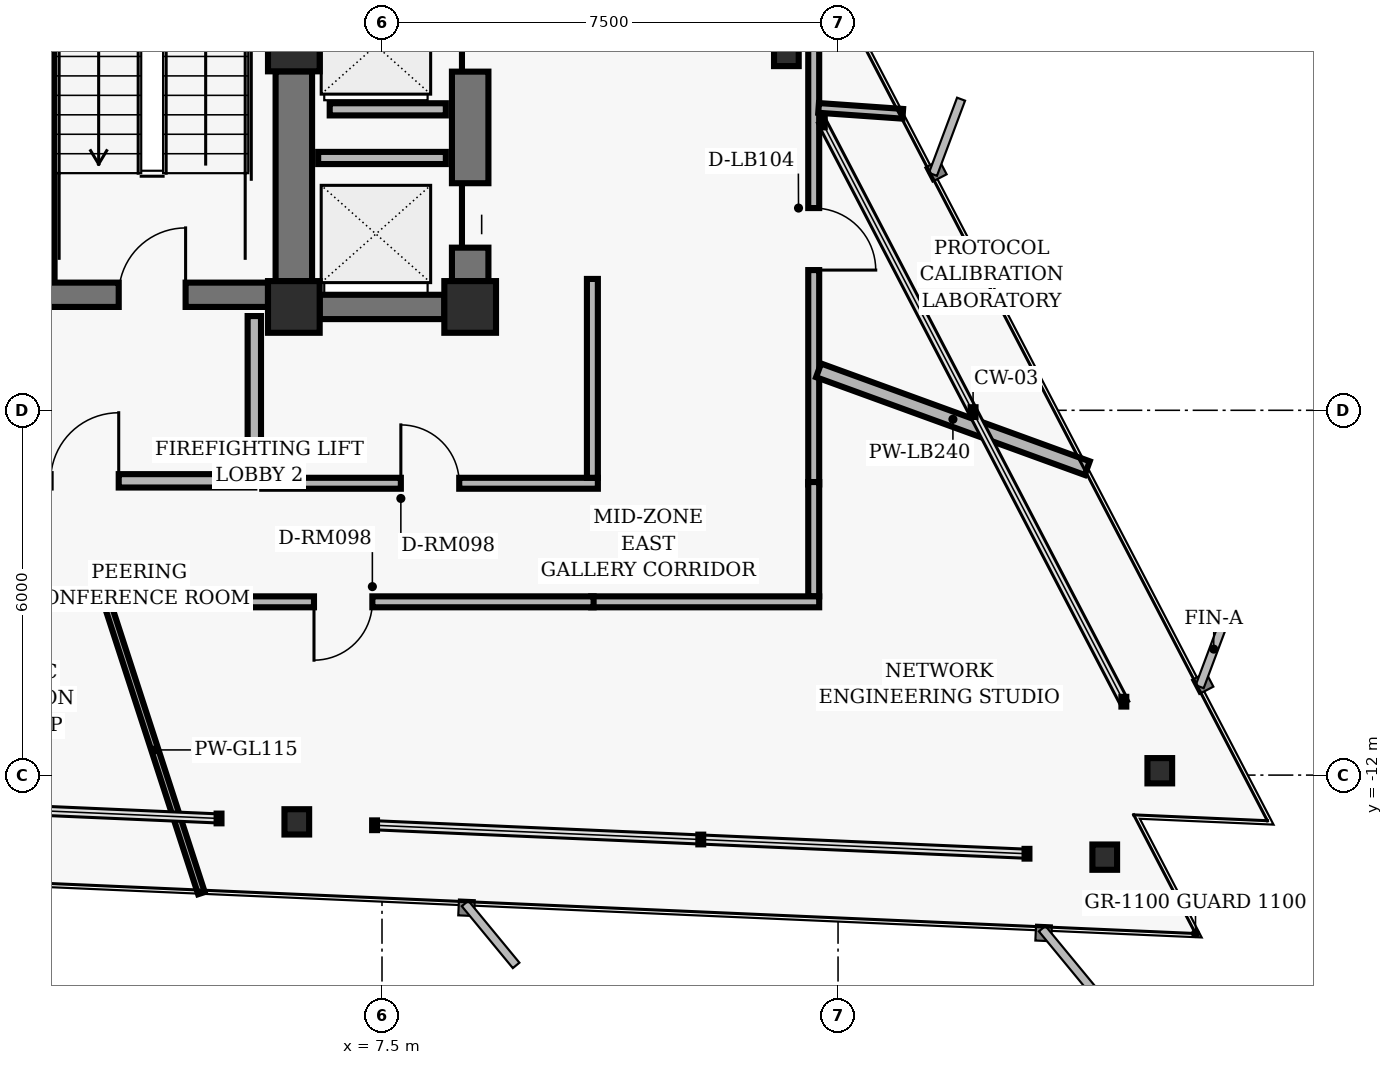
"""IFC4 building model, lengths in metres.
Left out: names, types, materials, properties, quantities, classifications, styles, units other than length and angle.
Written with IfcOpenShell. Run it as: python <this file> out.ifc"""

import sys

from ifc_helpers import new_model, si_unit, direction, frame, frame_2d, origin, origin_2d, place, context, subcontext, project, spatial, rectangle, hollow_rectangle, i_section, extrude, element, fill, save


model = new_model("IFC4")
c1 = context("Model", 3, precision=1e-05, world=origin(), true_north=direction((0.0, 1.0)))
c2 = subcontext(c1, "Body", "Model", "MODEL_VIEW")
j1 = project(units=[si_unit("LENGTHUNIT", "METRE"), si_unit("PLANEANGLEUNIT", "RADIAN")], contexts=[c1])
p1 = place(None, origin())
s1 = spatial("IfcSite", under=j1, at=p1, CompositionType="ELEMENT")
p2 = place(p1, origin())
s2 = spatial("IfcBuilding", under=s1, at=p2, CompositionType="ELEMENT")
p3 = place(p2, frame((0.0, 0.0, 135.04)))
s3 = spatial("IfcBuildingStorey", under=s2, at=p3, CompositionType="ELEMENT", Elevation=135.04)
for number, where, z_axis, x_axis in (
    (1, (6.05, 0.0, 0.0), (0.0, 0.0, 1.0), (1.0, 0.0, 0.0)),
    (2, (6.05, -4.3, 0.0), (0.0, 0.0, 1.0), (1.0, 0.0, 0.0)),
    (3, (8.95, -4.3, 0.0), (0.0, 0.0, 1.0), (1.0, 0.0, 0.0)),
):
    element("IfcColumn", number, at=place(p3, frame(where, z_axis=z_axis, x_axis=x_axis)), inside=s3, PredefinedType="COLUMN", context=c2, shape_type="SweptSolid", body=[
        extrude(hollow_rectangle(XDim=0.85, YDim=0.85, WallThickness=0.055, InnerFilletRadius=0.02, OuterFilletRadius=0.04, at=origin_2d()), origin(), (0.0, 0.0, 1.0), 3.04),
    ])
p4 = place(p3, frame((6.05, -3.875, 0.0), z_axis=(0.0, 0.0, 1.0), x_axis=(0.0, 1.0, 0.0)))
e4 = element("IfcWall", 4, at=p4, inside=s3, PredefinedType="SHEAR", context=c2, shape_type="SweptSolid", body=[
    extrude(rectangle(XDim=3.45, YDim=0.6, at=frame_2d((1.725, 0.0))), origin(), (0.0, 0.0, 1.0), 2.788),
])
p5 = place(p3, frame((1.94, -4.1, 0.0), z_axis=(0.0, 0.0, 1.0), x_axis=(0.0, 1.0, 0.0)))
e5 = element("IfcWall", 5, at=p5, inside=s3, PredefinedType="SHEAR", context=c2, shape_type="SweptSolid", body=[
    extrude(rectangle(XDim=8.2, YDim=0.35, at=frame_2d((4.1, 0.0))), origin(), (0.0, 0.0, 1.0), 2.788),
])
p6 = place(p3, frame((-5.625, -4.1, 0.0), z_axis=(0.0, 0.0, 1.0), x_axis=(1.0, 0.0, 0.0)))
e6 = element("IfcWall", 6, at=p6, inside=s3, PredefinedType="SHEAR", context=c2, shape_type="SweptSolid", body=[
    extrude(rectangle(XDim=11.25, YDim=0.4, at=frame_2d((5.625, 0.0))), origin(), (0.0, 0.0, 1.0), 2.788),
])
p7 = place(p6, frame((1.355, 0.0, 0.0)))
e7 = element("IfcOpeningElement", 7, at=p7, cuts=e6, PredefinedType="OPENING", context=c2, shape_type="SweptSolid", body=[
    extrude(rectangle(XDim=1.1, YDim=2.04, at=frame_2d((0.55, 1.02))), frame((0.0, 0.21, 0.0), z_axis=(0.0, -1.0, 0.0), x_axis=(1.0, 0.0, 0.0)), (0.0, 0.0, 1.0), 0.42),
])
p8 = place(p6, frame((8.795, 0.0, 0.0)))
e8 = element("IfcOpeningElement", 8, at=p8, cuts=e6, PredefinedType="OPENING", context=c2, shape_type="SweptSolid", body=[
    extrude(rectangle(XDim=1.1, YDim=2.04, at=frame_2d((0.55, 1.02))), frame((0.0, 0.21, 0.0), z_axis=(0.0, -1.0, 0.0), x_axis=(1.0, 0.0, 0.0)), (0.0, 0.0, 1.0), 0.42),
])
p9 = place(p6, frame((4.095, 0.0, 0.0)))
e9 = element("IfcOpeningElement", 9, at=p9, cuts=e6, PredefinedType="OPENING", context=c2, shape_type="SweptSolid", body=[
    extrude(rectangle(XDim=1.06, YDim=2.04, at=frame_2d((0.53, 1.02))), frame((0.0, 0.21, 0.0), z_axis=(0.0, -1.0, 0.0), x_axis=(1.0, 0.0, 0.0)), (0.0, 0.0, 1.0), 0.42),
])
p10 = place(p6, frame((6.095, 0.0, 0.0)))
e10 = element("IfcOpeningElement", 10, at=p10, cuts=e6, PredefinedType="OPENING", context=c2, shape_type="SweptSolid", body=[
    extrude(rectangle(XDim=1.06, YDim=2.04, at=frame_2d((0.53, 1.02))), frame((0.0, 0.21, 0.0), z_axis=(0.0, -1.0, 0.0), x_axis=(1.0, 0.0, 0.0)), (0.0, 0.0, 1.0), 0.42),
])
p11 = place(p3, frame((8.95, -3.875, 0.0), z_axis=(0.0, 0.0, 1.0), x_axis=(0.0, 1.0, 0.0)))
e11 = element("IfcWall", 11, at=p11, inside=s3, PredefinedType="SHEAR", context=c2, shape_type="SweptSolid", body=[
    extrude(rectangle(XDim=7.95, YDim=0.6, at=frame_2d((3.975, 0.0))), origin(), (0.0, 0.0, 1.0), 2.788),
])
p12 = place(p11, frame((0.55, 0.0, 0.0)))
e12 = element("IfcOpeningElement", 12, at=p12, cuts=e11, PredefinedType="OPENING", context=c2, shape_type="SweptSolid", body=[
    extrude(rectangle(XDim=1.06, YDim=2.04, at=frame_2d((0.53, 1.02))), frame((0.0, 0.31, 0.0), z_axis=(0.0, -1.0, 0.0), x_axis=(1.0, 0.0, 0.0)), (0.0, 0.0, 1.0), 0.62),
])
p13 = place(p11, frame((3.445, 0.0, 0.0)))
e13 = element("IfcOpeningElement", 13, at=p13, cuts=e11, PredefinedType="OPENING", context=c2, shape_type="SweptSolid", body=[
    extrude(rectangle(XDim=1.06, YDim=2.04, at=frame_2d((0.53, 1.02))), frame((0.0, 0.31, 0.0), z_axis=(0.0, -1.0, 0.0), x_axis=(1.0, 0.0, 0.0)), (0.0, 0.0, 1.0), 0.62),
])
p14 = place(p11, frame((6.33, 0.0, 0.0)))
e14 = element("IfcOpeningElement", 14, at=p14, cuts=e11, PredefinedType="OPENING", context=c2, shape_type="SweptSolid", body=[
    extrude(rectangle(XDim=1.06, YDim=2.04, at=frame_2d((0.53, 1.02))), frame((0.0, 0.31, 0.0), z_axis=(0.0, -1.0, 0.0), x_axis=(1.0, 0.0, 0.0)), (0.0, 0.0, 1.0), 0.62),
])
p15 = place(p3, frame((6.475, -4.3, 0.0), z_axis=(0.0, 0.0, 1.0), x_axis=(1.0, 0.0, 0.0)))
e15 = element("IfcWall", 15, at=p15, inside=s3, PredefinedType="SHEAR", context=c2, shape_type="SweptSolid", body=[
    extrude(rectangle(XDim=2.05, YDim=0.4, at=frame_2d((1.025, 0.0))), origin(), (0.0, 0.0, 1.0), 2.788),
])
for number, where, z_axis, x_axis in (
    (16, (20.292, -11.928, 0.0), (0.0, 0.0, 1.0), (1.0, 0.0, 0.0)),
    (17, (14.15, -0.131, 0.0), (0.0, 0.0, 1.0), (1.0, 0.0, 0.0)),
    (18, (6.099, -12.769, 0.0), (0.0, 0.0, 1.0), (1.0, 0.0, 0.0)),
    (19, (19.386, -13.349, 0.0), (0.0, 0.0, 1.0), (1.0, 0.0, 0.0)),
):
    element("IfcColumn", number, at=place(p3, frame(where, z_axis=z_axis, x_axis=x_axis)), inside=s3, PredefinedType="COLUMN", context=c2, shape_type="SweptSolid", body=[
        extrude(i_section(OverallWidth=0.406, OverallDepth=0.416, WebThickness=0.03, FlangeThickness=0.048, FilletRadius=0.02, at=origin_2d()), origin(), (0.0, 0.0, 1.0), 3.04),
    ])
p16 = place(p3, frame((5.4, -7.16, 0.0), z_axis=(0.0, 0.0, 1.0), x_axis=(0.0, 1.0, 0.0)))
e20 = element("IfcWall", 20, at=p16, inside=s3, PredefinedType="PARTITIONING", context=c2, shape_type="SweptSolid", body=[
    extrude(rectangle(XDim=2.71, YDim=0.22, at=frame_2d((1.355, 0.0))), origin(), (0.0, 0.0, 1.0), 2.763),
])
p17 = place(p3, frame((0.0, -7.16, 0.0), z_axis=(0.0, 0.0, 1.0), x_axis=(1.0, 0.0, 0.0)))
e21 = element("IfcWall", 21, at=p17, inside=s3, PredefinedType="PARTITIONING", context=c2, shape_type="SweptSolid", body=[
    extrude(rectangle(XDim=5.4, YDim=0.22, at=frame_2d((2.7, 0.0))), origin(), (0.0, 0.0, 1.0), 2.33),
])
p18 = place(p17, frame((2.05, 0.0, 0.0)))
e22 = element("IfcOpeningElement", 22, at=p18, cuts=e21, PredefinedType="OPENING", context=c2, shape_type="SweptSolid", body=[
    extrude(rectangle(XDim=1.12, YDim=2.02, at=frame_2d((0.56, 1.01))), frame((0.0, 0.12, 0.0), z_axis=(0.0, -1.0, 0.0), x_axis=(1.0, 0.0, 0.0)), (0.0, 0.0, 1.0), 0.24),
])
p19 = place(p3, frame((6.45, -1.85, 0.0), z_axis=(0.0, 0.0, 1.0), x_axis=(1.0, 0.0, 0.0)))
e23 = element("IfcWall", 23, at=p19, inside=s3, PredefinedType="PARTITIONING", context=c2, shape_type="SweptSolid", body=[
    extrude(rectangle(XDim=2.1, YDim=0.2, at=frame_2d((1.05, 0.0))), origin(), (0.0, 0.0, 1.0), 2.763),
])
p20 = place(p3, frame((6.64, -1.05, 0.0), z_axis=(0.0, 0.0, 1.0), x_axis=(1.0, 0.0, 0.0)))
e24 = element("IfcWall", 24, at=p20, inside=s3, PredefinedType="PARTITIONING", context=c2, shape_type="SweptSolid", body=[
    extrude(rectangle(XDim=1.91, YDim=0.2, at=frame_2d((0.955, 0.0))), origin(), (0.0, 0.0, 1.0), 2.763),
])
p21 = place(p3, frame((14.6, 0.26, 0.0), z_axis=(0.0, 0.0, 1.0), x_axis=(0.0, -1.0, 0.0)))
e25 = element("IfcWall", 25, at=p21, inside=s3, PredefinedType="PARTITIONING", context=c2, shape_type="SweptSolid", body=[
    extrude(rectangle(XDim=7.479, YDim=0.18, at=frame_2d((3.74, 0.0))), origin(), (0.0, 0.0, 1.0), 2.763),
])
p22 = place(p21, frame((2.933, 0.0, 0.0)))
e26 = element("IfcOpeningElement", 26, at=p22, cuts=e25, PredefinedType="OPENING", context=c2, shape_type="SweptSolid", body=[
    extrude(rectangle(XDim=1.02, YDim=2.02, at=frame_2d((0.51, 1.01))), frame((0.0, 0.1, 0.0), z_axis=(0.0, -1.0, 0.0), x_axis=(1.0, 0.0, 0.0)), (0.0, 0.0, 1.0), 0.2),
])
p23 = place(p3, frame((14.6, -7.18, 0.0), z_axis=(0.0, 0.0, 1.0), x_axis=(0.0, -1.0, 0.0)))
e27 = element("IfcWall", 27, at=p23, inside=s3, PredefinedType="PARTITIONING", context=c2, shape_type="SweptSolid", body=[
    extrude(rectangle(XDim=1.88, YDim=0.18, at=frame_2d((0.94, 0.0))), origin(), (0.0, 0.0, 1.0), 2.763),
])
p24 = place(p3, frame((14.69, -9.15, 0.0), z_axis=(0.0, 0.0, 1.0), x_axis=(-1.0, 0.0, 0.0)))
e28 = element("IfcWall", 28, at=p24, inside=s3, PredefinedType="PARTITIONING", context=c2, shape_type="SweptSolid", body=[
    extrude(rectangle(XDim=3.75, YDim=0.18, at=frame_2d((1.875, 0.0))), origin(), (0.0, 0.0, 1.0), 2.33),
])
p25 = place(p3, frame((10.98, -9.15, 0.0), z_axis=(0.0, 0.0, 1.0), x_axis=(-1.0, 0.0, 0.0)))
e29 = element("IfcWall", 29, at=p25, inside=s3, PredefinedType="PARTITIONING", context=c2, shape_type="SweptSolid", body=[
    extrude(rectangle(XDim=17.5, YDim=0.18, at=frame_2d((8.75, 0.0))), origin(), (0.0, 0.0, 1.0), 2.33),
])
p26 = place(p25, frame((12.102, 0.0, 0.0)))
e30 = element("IfcOpeningElement", 30, at=p26, cuts=e29, PredefinedType="OPENING", context=c2, shape_type="SweptSolid", body=[
    extrude(rectangle(XDim=1.02, YDim=2.02, at=frame_2d((0.51, 1.01))), frame((0.0, 0.1, 0.0), z_axis=(0.0, -1.0, 0.0), x_axis=(1.0, 0.0, 0.0)), (0.0, 0.0, 1.0), 0.2),
])
p27 = place(p25, frame((3.639, 0.0, 0.0)))
e31 = element("IfcOpeningElement", 31, at=p27, cuts=e29, PredefinedType="OPENING", context=c2, shape_type="SweptSolid", body=[
    extrude(rectangle(XDim=0.96, YDim=2.02, at=frame_2d((0.48, 1.01))), frame((0.0, 0.1, 0.0), z_axis=(0.0, -1.0, 0.0), x_axis=(1.0, 0.0, 0.0)), (0.0, 0.0, 1.0), 0.2),
])
p28 = place(p3, frame((5.53, -7.2, 0.0), z_axis=(0.0, 0.0, 1.0), x_axis=(1.0, 0.0, 0.0)))
e32 = element("IfcWall", 32, at=p28, inside=s3, PredefinedType="PARTITIONING", context=c2, shape_type="SweptSolid", body=[
    extrude(rectangle(XDim=5.52, YDim=0.18, at=frame_2d((2.76, 0.0))), origin(), (0.0, 0.0, 1.0), 2.33),
])
p29 = place(p28, frame((2.28, 0.0, 0.0)))
e33 = element("IfcOpeningElement", 33, at=p29, cuts=e32, PredefinedType="OPENING", context=c2, shape_type="SweptSolid", body=[
    extrude(rectangle(XDim=0.96, YDim=2.02, at=frame_2d((0.48, 1.01))), frame((0.0, 0.1, 0.0), z_axis=(0.0, -1.0, 0.0), x_axis=(1.0, 0.0, 0.0)), (0.0, 0.0, 1.0), 0.2),
])
p30 = place(p3, frame((10.96, -7.11, 0.0), z_axis=(0.0, 0.0, 1.0), x_axis=(0.0, 1.0, 0.0)))
e34 = element("IfcWall", 34, at=p30, inside=s3, PredefinedType="PARTITIONING", context=c2, shape_type="SweptSolid", body=[
    extrude(rectangle(XDim=3.271, YDim=0.18, at=frame_2d((1.635, 0.0))), origin(), (0.0, 0.0, 1.0), 2.763),
])
p31 = place(p3, frame((2.999, -9.23, 0.0), z_axis=(0.0, 0.0, 1.0), x_axis=(0.309019216851, -0.951055794166, 0.0)))
e35 = element("IfcWall", 35, at=p31, inside=s3, PredefinedType="MOVABLE", context=c2, shape_type="SweptSolid", body=[
    extrude(rectangle(XDim=4.954, YDim=0.115, at=frame_2d((2.477, 0.0))), origin(), (0.0, 0.0, 1.0), 2.763),
])
p32 = place(p3, frame((14.68, -5.343, 0.0), z_axis=(0.0, 0.0, 1.0), x_axis=(0.939684231706, -0.342043191253, 0.0)))
e36 = element("IfcWall", 36, at=p32, inside=s3, PredefinedType="PARTITIONING", context=c2, shape_type="SweptSolid", body=[
    extrude(rectangle(XDim=4.702, YDim=0.24, at=frame_2d((2.351, 0.0))), origin(), (0.0, 0.0, 1.0), 2.763),
])
p33 = place(p3, frame((14.68, -1.027, 0.0), z_axis=(0.0, 0.0, 1.0), x_axis=(0.997571691914, -0.06964710684, 0.0)))
e37 = element("IfcWall", 37, at=p33, inside=s3, PredefinedType="PARTITIONING", context=c2, shape_type="SweptSolid", body=[
    extrude(rectangle(XDim=1.388, YDim=0.16, at=frame_2d((0.694, 0.0))), origin(), (0.0, 0.0, 1.0), 2.763),
])
p34 = place(p8, origin())
e38 = element("IfcDoor", 38, at=p34, inside=s3, OperationType="SINGLE_SWING_RIGHT", PredefinedType="DOOR", context=c2, shape_type="SweptSolid", body=[
    extrude(rectangle(XDim=1.1, YDim=2.04, at=frame_2d((0.55, 1.02))), frame((0.0, 0.025, 0.0), z_axis=(0.0, -1.0, 0.0), x_axis=(1.0, 0.0, 0.0)), (0.0, 0.0, 1.0), 0.05),
])
fill(e8, e38)
p35 = place(p18, origin())
e39 = element("IfcDoor", 39, at=p35, inside=s3, OperationType="SINGLE_SWING_RIGHT", PredefinedType="DOOR", context=c2, shape_type="SweptSolid", body=[
    extrude(rectangle(XDim=1.12, YDim=2.02, at=frame_2d((0.56, 1.01))), frame((0.0, 0.025, 0.0), z_axis=(0.0, -1.0, 0.0), x_axis=(1.0, 0.0, 0.0)), (0.0, 0.0, 1.0), 0.05),
])
fill(e22, e39)
p36 = place(p12, origin())
e40 = element("IfcDoor", 40, at=p36, inside=s3, OperationType="SLIDING_TO_LEFT", PredefinedType="DOOR", context=c2, shape_type="SweptSolid", body=[
    extrude(rectangle(XDim=1.06, YDim=2.04, at=frame_2d((0.53, 1.02))), frame((0.0, 0.025, 0.0), z_axis=(0.0, -1.0, 0.0), x_axis=(1.0, 0.0, 0.0)), (0.0, 0.0, 1.0), 0.05),
])
fill(e12, e40)
p37 = place(p13, origin())
e41 = element("IfcDoor", 41, at=p37, inside=s3, OperationType="SLIDING_TO_RIGHT", PredefinedType="DOOR", context=c2, shape_type="SweptSolid", body=[
    extrude(rectangle(XDim=1.06, YDim=2.04, at=frame_2d((0.53, 1.02))), frame((0.0, 0.025, 0.0), z_axis=(0.0, -1.0, 0.0), x_axis=(1.0, 0.0, 0.0)), (0.0, 0.0, 1.0), 0.05),
])
fill(e13, e41)
p38 = place(p27, origin())
e42 = element("IfcDoor", 42, at=p38, inside=s3, OperationType="SINGLE_SWING_RIGHT", PredefinedType="DOOR", context=c2, shape_type="SweptSolid", body=[
    extrude(rectangle(XDim=0.96, YDim=2.02, at=frame_2d((0.48, 1.01))), frame((0.0, 0.025, 0.0), z_axis=(0.0, -1.0, 0.0), x_axis=(1.0, 0.0, 0.0)), (0.0, 0.0, 1.0), 0.05),
])
fill(e31, e42)
p39 = place(p29, origin())
e43 = element("IfcDoor", 43, at=p39, inside=s3, OperationType="SINGLE_SWING_LEFT", PredefinedType="DOOR", context=c2, shape_type="SweptSolid", body=[
    extrude(rectangle(XDim=0.96, YDim=2.02, at=frame_2d((0.48, 1.01))), frame((0.0, 0.025, 0.0), z_axis=(0.0, -1.0, 0.0), x_axis=(1.0, 0.0, 0.0)), (0.0, 0.0, 1.0), 0.05),
])
fill(e33, e43)
p40 = place(p22, origin())
e44 = element("IfcDoor", 44, at=p40, inside=s3, OperationType="SINGLE_SWING_RIGHT", PredefinedType="DOOR", context=c2, shape_type="SweptSolid", body=[
    extrude(rectangle(XDim=1.02, YDim=2.02, at=frame_2d((0.51, 1.01))), frame((0.0, 0.025, 0.0), z_axis=(0.0, -1.0, 0.0), x_axis=(1.0, 0.0, 0.0)), (0.0, 0.0, 1.0), 0.05),
])
fill(e26, e44)
save(model, sys.argv[1])
